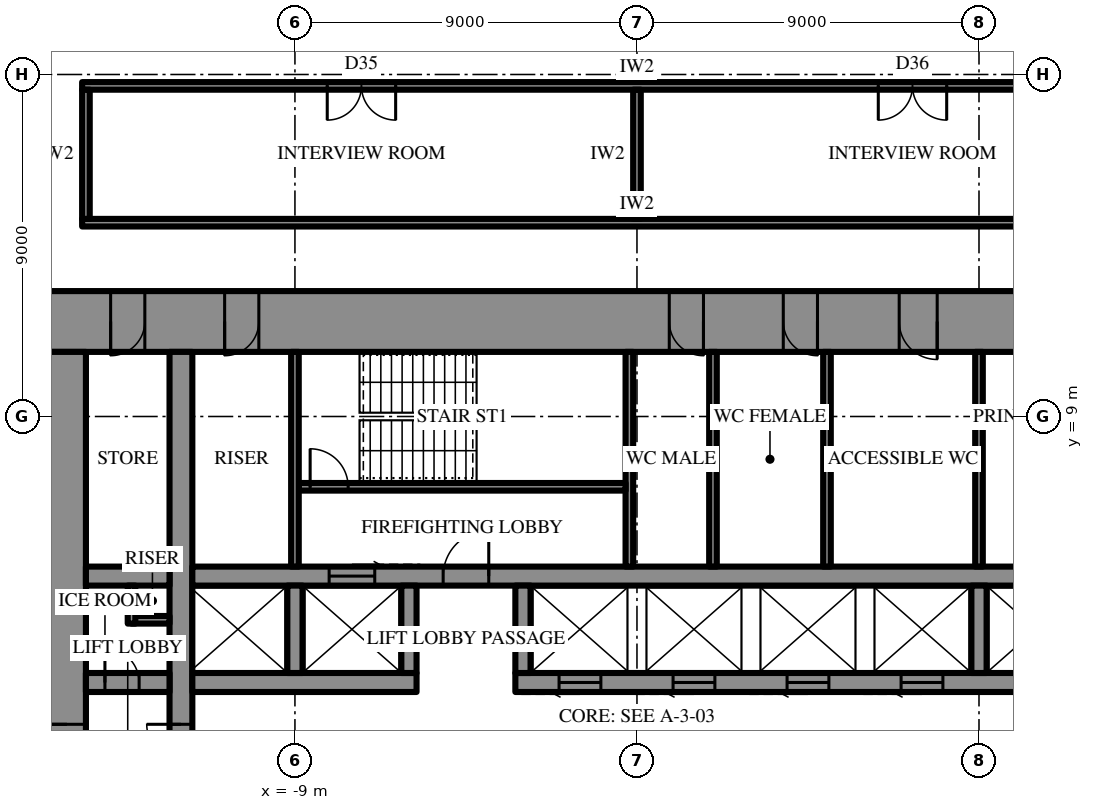
"""IFC4 building model, lengths in metres.
Left out: names, types, materials, properties, quantities, classifications, styles, units other than length and angle.
Written with IfcOpenShell. Run it as: python <this file> out.ifc"""

import sys

from ifc_helpers import new_model, si_unit, direction, frame, frame_2d, origin, place, context, subcontext, project, spatial, rectangle, extrude, element, fill, save


model = new_model("IFC4")
c1 = context("Model", 3, precision=1e-05, world=origin(), true_north=direction((0.0, 1.0)))
c2 = subcontext(c1, "Body", "Model", "MODEL_VIEW")
j1 = project(units=[si_unit("LENGTHUNIT", "METRE"), si_unit("PLANEANGLEUNIT", "RADIAN")], contexts=[c1])
p1 = place(None, origin())
s1 = spatial("IfcSite", under=j1, at=p1, CompositionType="ELEMENT")
p2 = place(p1, origin())
s2 = spatial("IfcBuilding", under=s1, at=p2, CompositionType="ELEMENT")
p3 = place(p2, frame((0.0, 0.0, 240.7)))
s3 = spatial("IfcBuildingStorey", under=s2, at=p3, CompositionType="ELEMENT", Elevation=240.7)
p4 = place(p3, frame((-15.5, 11.5, 0.0), z_axis=(0.0, 0.0, 1.0), x_axis=(1.0, 0.0, 0.0)))
e1 = element("IfcWall", 1, at=p4, inside=s3, PredefinedType="SHEAR", context=c2, shape_type="SweptSolid", body=[
    extrude(rectangle(XDim=31.0, YDim=1.6, at=frame_2d((15.5, 0.0))), origin(), (0.0, 0.0, 1.0), 4.2),
])
p5 = place(p4, frame((16.35, 0.0, 0.0)))
e2 = element("IfcOpeningElement", 2, at=p5, cuts=e1, PredefinedType="OPENING", context=c2, shape_type="SweptSolid", body=[
    extrude(rectangle(XDim=0.9, YDim=2.2, at=frame_2d((0.45, 1.1))), frame((0.0, 0.81, 0.0), z_axis=(0.0, -1.0, 0.0), x_axis=(1.0, 0.0, 0.0)), (0.0, 0.0, 1.0), 1.62),
])
p6 = place(p4, frame((19.35, 0.0, 0.0)))
e3 = element("IfcOpeningElement", 3, at=p6, cuts=e1, PredefinedType="OPENING", context=c2, shape_type="SweptSolid", body=[
    extrude(rectangle(XDim=0.9, YDim=2.2, at=frame_2d((0.45, 1.1))), frame((0.0, 0.81, 0.0), z_axis=(0.0, -1.0, 0.0), x_axis=(1.0, 0.0, 0.0)), (0.0, 0.0, 1.0), 1.62),
])
p7 = place(p4, frame((22.4, 0.0, 0.0)))
e4 = element("IfcOpeningElement", 4, at=p7, cuts=e1, PredefinedType="OPENING", context=c2, shape_type="SweptSolid", body=[
    extrude(rectangle(XDim=1.0, YDim=2.2, at=frame_2d((0.5, 1.1))), frame((0.0, 0.81, 0.0), z_axis=(0.0, -1.0, 0.0), x_axis=(1.0, 0.0, 0.0)), (0.0, 0.0, 1.0), 1.62),
])
p8 = place(p4, frame((1.65, 0.0, 0.0)))
e5 = element("IfcOpeningElement", 5, at=p8, cuts=e1, PredefinedType="OPENING", context=c2, shape_type="SweptSolid", body=[
    extrude(rectangle(XDim=0.9, YDim=2.2, at=frame_2d((0.45, 1.1))), frame((0.0, 0.81, 0.0), z_axis=(0.0, -1.0, 0.0), x_axis=(1.0, 0.0, 0.0)), (0.0, 0.0, 1.0), 1.62),
])
p9 = place(p4, frame((4.65, 0.0, 0.0)))
e6 = element("IfcOpeningElement", 6, at=p9, cuts=e1, PredefinedType="OPENING", context=c2, shape_type="SweptSolid", body=[
    extrude(rectangle(XDim=0.9, YDim=2.2, at=frame_2d((0.45, 1.1))), frame((0.0, 0.81, 0.0), z_axis=(0.0, -1.0, 0.0), x_axis=(1.0, 0.0, 0.0)), (0.0, 0.0, 1.0), 1.62),
])
p10 = place(p4, frame((25.45, 0.0, 0.0)))
e7 = element("IfcOpeningElement", 7, at=p10, cuts=e1, PredefinedType="OPENING", context=c2, shape_type="SweptSolid", body=[
    extrude(rectangle(XDim=0.9, YDim=2.2, at=frame_2d((0.45, 1.1))), frame((0.0, 0.81, 0.0), z_axis=(0.0, -1.0, 0.0), x_axis=(1.0, 0.0, 0.0)), (0.0, 0.0, 1.0), 1.62),
])
p11 = place(p4, frame((28.45, 0.0, 0.0)))
e8 = element("IfcOpeningElement", 8, at=p11, cuts=e1, PredefinedType="OPENING", context=c2, shape_type="SweptSolid", body=[
    extrude(rectangle(XDim=0.9, YDim=2.2, at=frame_2d((0.45, 1.1))), frame((0.0, 0.81, 0.0), z_axis=(0.0, -1.0, 0.0), x_axis=(1.0, 0.0, 0.0)), (0.0, 0.0, 1.0), 1.62),
])
p12 = place(p3, frame((-15.0, 10.7, 0.0), z_axis=(0.0, 0.0, 1.0), x_axis=(0.0, -1.0, 0.0)))
e9 = element("IfcWall", 9, at=p12, inside=s3, PredefinedType="SHEAR", context=c2, shape_type="SweptSolid", body=[
    extrude(rectangle(XDim=21.4, YDim=1.0, at=frame_2d((10.7, 0.0))), origin(), (0.0, 0.0, 1.0), 4.2),
])
p13 = place(p12, frame((9.8, 0.0, 0.0)))
e10 = element("IfcOpeningElement", 10, at=p13, cuts=e9, PredefinedType="OPENING", context=c2, shape_type="SweptSolid", body=[
    extrude(rectangle(XDim=1.8, YDim=2.4, at=frame_2d((0.9, 1.2))), frame((0.0, 0.51, 0.0), z_axis=(0.0, -1.0, 0.0), x_axis=(1.0, 0.0, 0.0)), (0.0, 0.0, 1.0), 1.02),
])
p14 = place(p3, frame((-12.0, -10.7, 0.0), z_axis=(0.0, 0.0, 1.0), x_axis=(0.0, 1.0, 0.0)))
e11 = element("IfcWall", 11, at=p14, inside=s3, PredefinedType="SHEAR", context=c2, shape_type="SweptSolid", body=[
    extrude(rectangle(XDim=21.4, YDim=0.6, at=frame_2d((10.7, 0.0))), origin(), (0.0, 0.0, 1.0), 4.2),
])
p15 = place(p14, frame((9.8, 0.0, 0.0)))
e12 = element("IfcOpeningElement", 12, at=p15, cuts=e11, PredefinedType="OPENING", context=c2, shape_type="SweptSolid", body=[
    extrude(rectangle(XDim=1.8, YDim=2.4, at=frame_2d((0.9, 1.2))), frame((0.0, 0.31, 0.0), z_axis=(0.0, -1.0, 0.0), x_axis=(1.0, 0.0, 0.0)), (0.0, 0.0, 1.0), 0.62),
])
p16 = place(p3, frame((-14.5, 2.0, 0.0), z_axis=(0.0, 0.0, 1.0), x_axis=(1.0, 0.0, 0.0)))
e13 = element("IfcWall", 13, at=p16, inside=s3, PredefinedType="SHEAR", context=c2, shape_type="SweptSolid", body=[
    extrude(rectangle(XDim=2.2, YDim=0.5, at=frame_2d((1.1, 0.0))), origin(), (0.0, 0.0, 1.0), 4.2),
])
p17 = place(p16, frame((0.5, 0.0, 0.0)))
e14 = element("IfcOpeningElement", 14, at=p17, cuts=e13, PredefinedType="OPENING", context=c2, shape_type="SweptSolid", body=[
    extrude(rectangle(XDim=0.9, YDim=2.2, at=frame_2d((0.45, 1.1))), frame((0.0, 0.26, 0.0), z_axis=(0.0, -1.0, 0.0), x_axis=(1.0, 0.0, 0.0)), (0.0, 0.0, 1.0), 0.52),
])
p18 = place(p3, frame((-11.7, 2.0, 0.0), z_axis=(0.0, 0.0, 1.0), x_axis=(1.0, 0.0, 0.0)))
e15 = element("IfcWall", 15, at=p18, inside=s3, PredefinedType="SHEAR", context=c2, shape_type="SweptSolid", body=[
    extrude(rectangle(XDim=5.9, YDim=0.5, at=frame_2d((2.95, 0.0))), origin(), (0.0, 0.0, 1.0), 4.2),
])
p19 = place(p3, frame((-3.2, 2.0, 0.0), z_axis=(0.0, 0.0, 1.0), x_axis=(1.0, 0.0, 0.0)))
e16 = element("IfcWall", 16, at=p19, inside=s3, PredefinedType="SHEAR", context=c2, shape_type="SweptSolid", body=[
    extrude(rectangle(XDim=14.9, YDim=0.5, at=frame_2d((7.45, 0.0))), origin(), (0.0, 0.0, 1.0), 4.2),
])
p20 = place(p19, frame((1.15, 0.0, 0.0)))
e17 = element("IfcOpeningElement", 17, at=p20, cuts=e16, PredefinedType="OPENING", context=c2, shape_type="SweptSolid", body=[
    extrude(rectangle(XDim=1.1, YDim=2.2, at=frame_2d((0.55, 1.1))), frame((0.0, 0.26, 0.0), z_axis=(0.0, -1.0, 0.0), x_axis=(1.0, 0.0, 0.0)), (0.0, 0.0, 1.0), 0.52),
])
p21 = place(p19, frame((4.15, 0.0, 0.0)))
e18 = element("IfcOpeningElement", 18, at=p21, cuts=e16, PredefinedType="OPENING", context=c2, shape_type="SweptSolid", body=[
    extrude(rectangle(XDim=1.1, YDim=2.2, at=frame_2d((0.55, 1.1))), frame((0.0, 0.26, 0.0), z_axis=(0.0, -1.0, 0.0), x_axis=(1.0, 0.0, 0.0)), (0.0, 0.0, 1.0), 0.52),
])
p22 = place(p19, frame((7.15, 0.0, 0.0)))
e19 = element("IfcOpeningElement", 19, at=p22, cuts=e16, PredefinedType="OPENING", context=c2, shape_type="SweptSolid", body=[
    extrude(rectangle(XDim=1.1, YDim=2.2, at=frame_2d((0.55, 1.1))), frame((0.0, 0.26, 0.0), z_axis=(0.0, -1.0, 0.0), x_axis=(1.0, 0.0, 0.0)), (0.0, 0.0, 1.0), 0.52),
])
p23 = place(p19, frame((10.15, 0.0, 0.0)))
e20 = element("IfcOpeningElement", 20, at=p23, cuts=e16, PredefinedType="OPENING", context=c2, shape_type="SweptSolid", body=[
    extrude(rectangle(XDim=1.1, YDim=2.2, at=frame_2d((0.55, 1.1))), frame((0.0, 0.26, 0.0), z_axis=(0.0, -1.0, 0.0), x_axis=(1.0, 0.0, 0.0)), (0.0, 0.0, 1.0), 0.52),
])
p24 = place(p3, frame((-14.5, 4.8, 0.0), z_axis=(0.0, 0.0, 1.0), x_axis=(1.0, 0.0, 0.0)))
e21 = element("IfcWall", 21, at=p24, inside=s3, PredefinedType="SHEAR", context=c2, shape_type="SweptSolid", body=[
    extrude(rectangle(XDim=2.2, YDim=0.5, at=frame_2d((1.1, 0.0))), origin(), (0.0, 0.0, 1.0), 4.2),
])
p25 = place(p3, frame((-11.7, 4.8, 0.0), z_axis=(0.0, 0.0, 1.0), x_axis=(1.0, 0.0, 0.0)))
e22 = element("IfcWall", 22, at=p25, inside=s3, PredefinedType="SHEAR", context=c2, shape_type="SweptSolid", body=[
    extrude(rectangle(XDim=23.4, YDim=0.5, at=frame_2d((11.7, 0.0))), origin(), (0.0, 0.0, 1.0), 4.2),
])
p26 = place(p25, frame((6.6, 0.0, 0.0)))
e23 = element("IfcOpeningElement", 23, at=p26, cuts=e22, PredefinedType="OPENING", context=c2, shape_type="SweptSolid", body=[
    extrude(rectangle(XDim=1.2, YDim=2.2, at=frame_2d((0.6, 1.1))), frame((0.0, 0.26, 0.0), z_axis=(0.0, -1.0, 0.0), x_axis=(1.0, 0.0, 0.0)), (0.0, 0.0, 1.0), 0.52),
])
p27 = place(p25, frame((3.6, 0.0, 0.0)))
e24 = element("IfcOpeningElement", 24, at=p27, cuts=e22, PredefinedType="OPENING", context=c2, shape_type="SweptSolid", body=[
    extrude(rectangle(XDim=1.2, YDim=2.2, at=frame_2d((0.6, 1.1))), frame((0.0, 0.26, 0.0), z_axis=(0.0, -1.0, 0.0), x_axis=(1.0, 0.0, 0.0)), (0.0, 0.0, 1.0), 0.52),
])
for number, where, z_axis, x_axis in (
    (25, (-9.0, 2.25, 0.0), (0.0, 0.0, 1.0), (0.0, 1.0, 0.0)),
    (26, (-6.0, 2.25, 0.0), (0.0, 0.0, 1.0), (0.0, 1.0, 0.0)),
    (27, (-3.0, 2.25, 0.0), (0.0, 0.0, 1.0), (0.0, 1.0, 0.0)),
    (28, (9.0, 2.25, 0.0), (0.0, 0.0, 1.0), (0.0, 1.0, 0.0)),
):
    element("IfcWall", number, at=place(p3, frame(where, z_axis=z_axis, x_axis=x_axis)), inside=s3, PredefinedType="SHEAR", context=c2, shape_type="SweptSolid", body=[
        extrude(rectangle(XDim=2.3, YDim=0.4, at=frame_2d((1.15, 0.0))), origin(), (0.0, 0.0, 1.0), 4.2),
    ])
p28 = place(p3, frame((-0.2, 5.05, 0.0), z_axis=(0.0, 0.0, 1.0), x_axis=(0.0, 1.0, 0.0)))
e29 = element("IfcWall", 29, at=p28, inside=s3, PredefinedType="SHEAR", context=c2, shape_type="SweptSolid", body=[
    extrude(rectangle(XDim=5.65, YDim=0.2, at=frame_2d((2.825, 0.0))), origin(), (0.0, 0.0, 1.0), 4.2),
])
p29 = place(p3, frame((-8.9, 7.15, 0.0), z_axis=(0.0, 0.0, 1.0), x_axis=(1.0, 0.0, 0.0)))
e30 = element("IfcWall", 30, at=p29, inside=s3, PredefinedType="SHEAR", context=c2, shape_type="SweptSolid", body=[
    extrude(rectangle(XDim=8.6, YDim=0.2, at=frame_2d((4.3, 0.0))), origin(), (0.0, 0.0, 1.0), 4.2),
])
p30 = place(p29, frame((0.3, 0.0, 0.0)))
e31 = element("IfcOpeningElement", 31, at=p30, cuts=e30, PredefinedType="OPENING", context=c2, shape_type="SweptSolid", body=[
    extrude(rectangle(XDim=1.0, YDim=2.2, at=frame_2d((0.5, 1.1))), frame((0.0, 0.11, 0.0), z_axis=(0.0, -1.0, 0.0), x_axis=(1.0, 0.0, 0.0)), (0.0, 0.0, 1.0), 0.22),
])
for number, where, z_axis, x_axis in (
    (32, (-9.0, 5.05, 0.0), (0.0, 0.0, 1.0), (0.0, 1.0, 0.0)),
    (33, (9.0, 5.05, 0.0), (0.0, 0.0, 1.0), (0.0, 1.0, 0.0)),
    (34, (2.0, 5.05, 0.0), (0.0, 0.0, 1.0), (0.0, 1.0, 0.0)),
    (35, (5.0, 5.05, 0.0), (0.0, 0.0, 1.0), (0.0, 1.0, 0.0)),
):
    element("IfcWall", number, at=place(p3, frame(where, z_axis=z_axis, x_axis=x_axis)), inside=s3, PredefinedType="PARTITIONING", context=c2, shape_type="SweptSolid", body=[
        extrude(rectangle(XDim=5.65, YDim=0.2, at=frame_2d((2.825, 0.0))), origin(), (0.0, 0.0, 1.0), 4.0),
    ])
for number, where, z_axis, x_axis in (
    (36, (-13.3, 3.65, 0.0), (0.0, 0.0, 1.0), (1.0, 0.0, 0.0)),
    (37, (-13.3, 3.55, 0.0), (0.0, 0.0, 1.0), (0.0, 1.0, 0.0)),
):
    element("IfcWall", number, at=place(p3, frame(where, z_axis=z_axis, x_axis=x_axis)), inside=s3, PredefinedType="PARTITIONING", context=c2, shape_type="SweptSolid", body=[
        extrude(rectangle(XDim=1.0, YDim=0.2, at=frame_2d((0.5, 0.0))), origin(), (0.0, 0.0, 1.0), 4.0),
    ])
p31 = place(p3, frame((-14.6, 14.1, 0.0), z_axis=(0.0, 0.0, 1.0), x_axis=(1.0, 0.0, 0.0)))
e38 = element("IfcWall", 38, at=p31, inside=s3, PredefinedType="PARTITIONING", context=c2, shape_type="SweptSolid", body=[
    extrude(rectangle(XDim=29.2, YDim=0.2, at=frame_2d((14.6, 0.0))), origin(), (0.0, 0.0, 1.0), 4.0),
])
p32 = place(p3, frame((-14.6, 17.7, 0.0), z_axis=(0.0, 0.0, 1.0), x_axis=(1.0, 0.0, 0.0)))
e39 = element("IfcWall", 39, at=p32, inside=s3, PredefinedType="PARTITIONING", context=c2, shape_type="SweptSolid", body=[
    extrude(rectangle(XDim=29.2, YDim=0.2, at=frame_2d((14.6, 0.0))), origin(), (0.0, 0.0, 1.0), 4.0),
])
p33 = place(p32, frame((6.45, 0.0, 0.0)))
e40 = element("IfcOpeningElement", 40, at=p33, cuts=e39, PredefinedType="OPENING", context=c2, shape_type="SweptSolid", body=[
    extrude(rectangle(XDim=1.8, YDim=2.4, at=frame_2d((0.9, 1.2))), frame((0.0, 0.11, 0.0), z_axis=(0.0, -1.0, 0.0), x_axis=(1.0, 0.0, 0.0)), (0.0, 0.0, 1.0), 0.22),
])
p34 = place(p32, frame((20.95, 0.0, 0.0)))
e41 = element("IfcOpeningElement", 41, at=p34, cuts=e39, PredefinedType="OPENING", context=c2, shape_type="SweptSolid", body=[
    extrude(rectangle(XDim=1.8, YDim=2.4, at=frame_2d((0.9, 1.2))), frame((0.0, 0.11, 0.0), z_axis=(0.0, -1.0, 0.0), x_axis=(1.0, 0.0, 0.0)), (0.0, 0.0, 1.0), 0.22),
])
p35 = place(p3, frame((-14.5, 14.2, 0.0), z_axis=(0.0, 0.0, 1.0), x_axis=(0.0, 1.0, 0.0)))
e42 = element("IfcWall", 42, at=p35, inside=s3, PredefinedType="PARTITIONING", context=c2, shape_type="SweptSolid", body=[
    extrude(rectangle(XDim=3.4, YDim=0.2, at=frame_2d((1.7, 0.0))), origin(), (0.0, 0.0, 1.0), 4.0),
])
p36 = place(p3, frame((0.0, 14.2, 0.0), z_axis=(0.0, 0.0, 1.0), x_axis=(0.0, 1.0, 0.0)))
e43 = element("IfcWall", 43, at=p36, inside=s3, PredefinedType="PARTITIONING", context=c2, shape_type="SweptSolid", body=[
    extrude(rectangle(XDim=3.4, YDim=0.2, at=frame_2d((1.7, 0.0))), origin(), (0.0, 0.0, 1.0), 2.992),
])
p37 = place(p13, frame((1.8, 0.0, 0.0), z_axis=(0.0, 0.0, 1.0), x_axis=(-1.0, 0.0, 0.0)))
e44 = element("IfcDoor", 44, at=p37, inside=s3, OperationType="DOUBLE_DOOR_SINGLE_SWING", PredefinedType="DOOR", context=c2, shape_type="SweptSolid", body=[
    extrude(rectangle(XDim=1.8, YDim=2.4, at=frame_2d((0.9, 1.2))), frame((0.0, 0.025, 0.0), z_axis=(0.0, -1.0, 0.0), x_axis=(1.0, 0.0, 0.0)), (0.0, 0.0, 1.0), 0.05),
])
fill(e10, e44)
p38 = place(p26, origin())
e45 = element("IfcDoor", 45, at=p38, inside=s3, OperationType="SINGLE_SWING_LEFT", PredefinedType="DOOR", context=c2, shape_type="SweptSolid", body=[
    extrude(rectangle(XDim=1.2, YDim=2.2, at=frame_2d((0.6, 1.1))), frame((0.0, 0.025, 0.0), z_axis=(0.0, -1.0, 0.0), x_axis=(1.0, 0.0, 0.0)), (0.0, 0.0, 1.0), 0.05),
])
fill(e23, e45)
p39 = place(p30, origin())
e46 = element("IfcDoor", 46, at=p39, inside=s3, OperationType="SINGLE_SWING_RIGHT", PredefinedType="DOOR", context=c2, shape_type="SweptSolid", body=[
    extrude(rectangle(XDim=1.0, YDim=2.2, at=frame_2d((0.5, 1.1))), frame((0.0, 0.025, 0.0), z_axis=(0.0, -1.0, 0.0), x_axis=(1.0, 0.0, 0.0)), (0.0, 0.0, 1.0), 0.05),
])
fill(e31, e46)
p40 = place(p5, frame((0.9, 0.0, 0.0), z_axis=(0.0, 0.0, 1.0), x_axis=(-1.0, 0.0, 0.0)))
e47 = element("IfcDoor", 47, at=p40, inside=s3, OperationType="SINGLE_SWING_RIGHT", PredefinedType="DOOR", context=c2, shape_type="SweptSolid", body=[
    extrude(rectangle(XDim=0.9, YDim=2.2, at=frame_2d((0.45, 1.1))), frame((0.0, 0.025, 0.0), z_axis=(0.0, -1.0, 0.0), x_axis=(1.0, 0.0, 0.0)), (0.0, 0.0, 1.0), 0.05),
])
fill(e2, e47)
p41 = place(p6, frame((0.9, 0.0, 0.0), z_axis=(0.0, 0.0, 1.0), x_axis=(-1.0, 0.0, 0.0)))
e48 = element("IfcDoor", 48, at=p41, inside=s3, OperationType="SINGLE_SWING_RIGHT", PredefinedType="DOOR", context=c2, shape_type="SweptSolid", body=[
    extrude(rectangle(XDim=0.9, YDim=2.2, at=frame_2d((0.45, 1.1))), frame((0.0, 0.025, 0.0), z_axis=(0.0, -1.0, 0.0), x_axis=(1.0, 0.0, 0.0)), (0.0, 0.0, 1.0), 0.05),
])
fill(e3, e48)
p42 = place(p7, frame((1.0, 0.0, 0.0), z_axis=(0.0, 0.0, 1.0), x_axis=(-1.0, 0.0, 0.0)))
e49 = element("IfcDoor", 49, at=p42, inside=s3, OperationType="SINGLE_SWING_RIGHT", PredefinedType="DOOR", context=c2, shape_type="SweptSolid", body=[
    extrude(rectangle(XDim=1.0, YDim=2.2, at=frame_2d((0.5, 1.1))), frame((0.0, 0.025, 0.0), z_axis=(0.0, -1.0, 0.0), x_axis=(1.0, 0.0, 0.0)), (0.0, 0.0, 1.0), 0.05),
])
fill(e4, e49)
p43 = place(p8, frame((0.9, 0.0, 0.0), z_axis=(0.0, 0.0, 1.0), x_axis=(-1.0, 0.0, 0.0)))
e50 = element("IfcDoor", 50, at=p43, inside=s3, OperationType="SINGLE_SWING_LEFT", PredefinedType="DOOR", context=c2, shape_type="SweptSolid", body=[
    extrude(rectangle(XDim=0.9, YDim=2.2, at=frame_2d((0.45, 1.1))), frame((0.0, 0.025, 0.0), z_axis=(0.0, -1.0, 0.0), x_axis=(1.0, 0.0, 0.0)), (0.0, 0.0, 1.0), 0.05),
])
fill(e5, e50)
p44 = place(p9, frame((0.9, 0.0, 0.0), z_axis=(0.0, 0.0, 1.0), x_axis=(-1.0, 0.0, 0.0)))
e51 = element("IfcDoor", 51, at=p44, inside=s3, OperationType="SINGLE_SWING_LEFT", PredefinedType="DOOR", context=c2, shape_type="SweptSolid", body=[
    extrude(rectangle(XDim=0.9, YDim=2.2, at=frame_2d((0.45, 1.1))), frame((0.0, 0.025, 0.0), z_axis=(0.0, -1.0, 0.0), x_axis=(1.0, 0.0, 0.0)), (0.0, 0.0, 1.0), 0.05),
])
fill(e6, e51)
p45 = place(p17, origin())
e52 = element("IfcDoor", 52, at=p45, inside=s3, OperationType="SINGLE_SWING_RIGHT", PredefinedType="DOOR", context=c2, shape_type="SweptSolid", body=[
    extrude(rectangle(XDim=0.9, YDim=2.2, at=frame_2d((0.45, 1.1))), frame((0.0, 0.025, 0.0), z_axis=(0.0, -1.0, 0.0), x_axis=(1.0, 0.0, 0.0)), (0.0, 0.0, 1.0), 0.05),
])
fill(e14, e52)
p46 = place(p15, origin())
e53 = element("IfcDoor", 53, at=p46, inside=s3, OperationType="DOUBLE_DOOR_SINGLE_SWING", PredefinedType="DOOR", context=c2, shape_type="SweptSolid", body=[
    extrude(rectangle(XDim=1.8, YDim=2.4, at=frame_2d((0.9, 1.2))), frame((0.0, 0.025, 0.0), z_axis=(0.0, -1.0, 0.0), x_axis=(1.0, 0.0, 0.0)), (0.0, 0.0, 1.0), 0.05),
])
fill(e12, e53)
p47 = place(p27, origin())
e54 = element("IfcDoor", 54, at=p47, inside=s3, OperationType="SLIDING_TO_LEFT", PredefinedType="DOOR", context=c2, shape_type="SweptSolid", body=[
    extrude(rectangle(XDim=1.2, YDim=2.2, at=frame_2d((0.6, 1.1))), frame((0.0, 0.025, 0.0), z_axis=(0.0, -1.0, 0.0), x_axis=(1.0, 0.0, 0.0)), (0.0, 0.0, 1.0), 0.05),
])
fill(e24, e54)
p48 = place(p20, frame((1.1, 0.0, 0.0), z_axis=(0.0, 0.0, 1.0), x_axis=(-1.0, 0.0, 0.0)))
e55 = element("IfcDoor", 55, at=p48, inside=s3, OperationType="SLIDING_TO_LEFT", PredefinedType="DOOR", context=c2, shape_type="SweptSolid", body=[
    extrude(rectangle(XDim=1.1, YDim=2.2, at=frame_2d((0.55, 1.1))), frame((0.0, 0.025, 0.0), z_axis=(0.0, -1.0, 0.0), x_axis=(1.0, 0.0, 0.0)), (0.0, 0.0, 1.0), 0.05),
])
fill(e17, e55)
p49 = place(p21, frame((1.1, 0.0, 0.0), z_axis=(0.0, 0.0, 1.0), x_axis=(-1.0, 0.0, 0.0)))
e56 = element("IfcDoor", 56, at=p49, inside=s3, OperationType="SLIDING_TO_LEFT", PredefinedType="DOOR", context=c2, shape_type="SweptSolid", body=[
    extrude(rectangle(XDim=1.1, YDim=2.2, at=frame_2d((0.55, 1.1))), frame((0.0, 0.025, 0.0), z_axis=(0.0, -1.0, 0.0), x_axis=(1.0, 0.0, 0.0)), (0.0, 0.0, 1.0), 0.05),
])
fill(e18, e56)
p50 = place(p22, frame((1.1, 0.0, 0.0), z_axis=(0.0, 0.0, 1.0), x_axis=(-1.0, 0.0, 0.0)))
e57 = element("IfcDoor", 57, at=p50, inside=s3, OperationType="SLIDING_TO_LEFT", PredefinedType="DOOR", context=c2, shape_type="SweptSolid", body=[
    extrude(rectangle(XDim=1.1, YDim=2.2, at=frame_2d((0.55, 1.1))), frame((0.0, 0.025, 0.0), z_axis=(0.0, -1.0, 0.0), x_axis=(1.0, 0.0, 0.0)), (0.0, 0.0, 1.0), 0.05),
])
fill(e19, e57)
p51 = place(p23, frame((1.1, 0.0, 0.0), z_axis=(0.0, 0.0, 1.0), x_axis=(-1.0, 0.0, 0.0)))
e58 = element("IfcDoor", 58, at=p51, inside=s3, OperationType="SLIDING_TO_LEFT", PredefinedType="DOOR", context=c2, shape_type="SweptSolid", body=[
    extrude(rectangle(XDim=1.1, YDim=2.2, at=frame_2d((0.55, 1.1))), frame((0.0, 0.025, 0.0), z_axis=(0.0, -1.0, 0.0), x_axis=(1.0, 0.0, 0.0)), (0.0, 0.0, 1.0), 0.05),
])
fill(e20, e58)
p52 = place(p33, frame((1.8, 0.0, 0.0), z_axis=(0.0, 0.0, 1.0), x_axis=(-1.0, 0.0, 0.0)))
e59 = element("IfcDoor", 59, at=p52, inside=s3, OperationType="DOUBLE_DOOR_SINGLE_SWING", PredefinedType="DOOR", context=c2, shape_type="SweptSolid", body=[
    extrude(rectangle(XDim=1.8, YDim=2.4, at=frame_2d((0.9, 1.2))), frame((0.0, 0.025, 0.0), z_axis=(0.0, -1.0, 0.0), x_axis=(1.0, 0.0, 0.0)), (0.0, 0.0, 1.0), 0.05),
])
fill(e40, e59)
p53 = place(p34, frame((1.8, 0.0, 0.0), z_axis=(0.0, 0.0, 1.0), x_axis=(-1.0, 0.0, 0.0)))
e60 = element("IfcDoor", 60, at=p53, inside=s3, OperationType="DOUBLE_DOOR_SINGLE_SWING", PredefinedType="DOOR", context=c2, shape_type="SweptSolid", body=[
    extrude(rectangle(XDim=1.8, YDim=2.4, at=frame_2d((0.9, 1.2))), frame((0.0, 0.025, 0.0), z_axis=(0.0, -1.0, 0.0), x_axis=(1.0, 0.0, 0.0)), (0.0, 0.0, 1.0), 0.05),
])
fill(e41, e60)
save(model, sys.argv[1])
